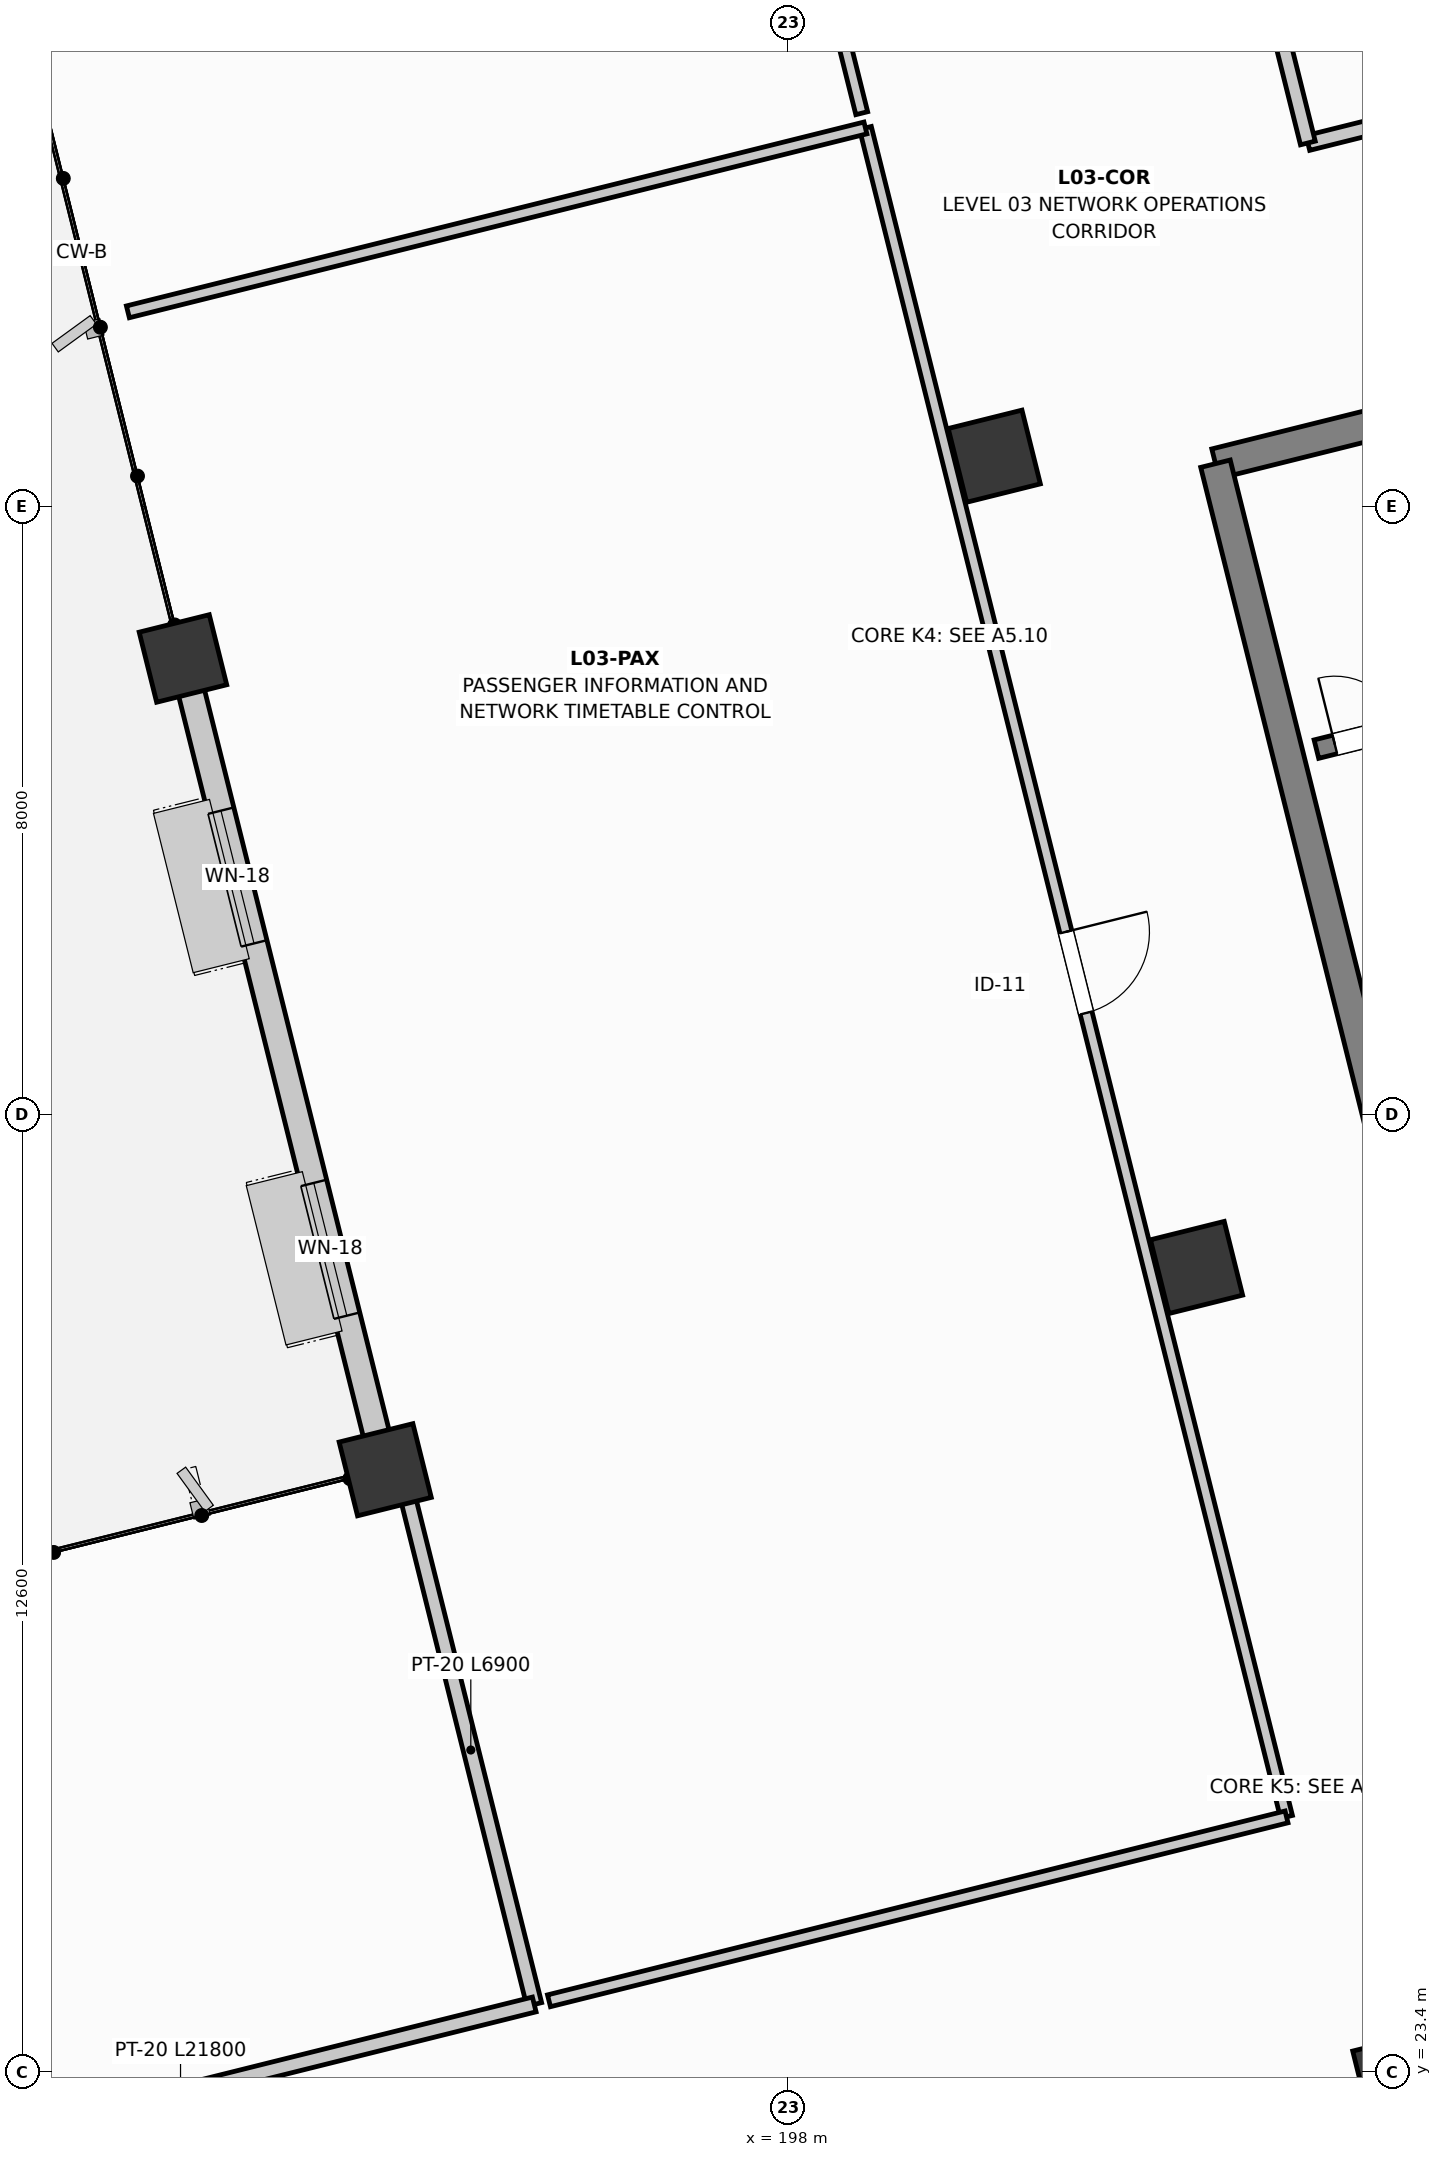
"""IFC4 building model, lengths in metres.
Left out: names, types, materials, properties, quantities, classifications, styles, units other than length and angle.
Written with IfcOpenShell. Run it as: python <this file> out.ifc"""

import sys

from ifc_helpers import new_model, si_unit, direction, frame, frame_2d, origin, origin_2d, place, context, subcontext, project, spatial, rectangle, extrude, element, fill, save


model = new_model("IFC4")
c1 = context("Model", 3, precision=1e-05, world=origin(), true_north=direction((0.0, 1.0)))
c2 = subcontext(c1, "Body", "Model", "MODEL_VIEW")
j1 = project(units=[si_unit("LENGTHUNIT", "METRE"), si_unit("PLANEANGLEUNIT", "RADIAN")], contexts=[c1])
p1 = place(None, origin())
s1 = spatial("IfcSite", under=j1, at=p1, CompositionType="ELEMENT")
p2 = place(p1, origin())
s2 = spatial("IfcBuilding", under=s1, at=p2, CompositionType="ELEMENT")
p3 = place(p2, frame((0.0, 0.0, 16.2)))
s3 = spatial("IfcBuildingStorey", under=s2, at=p3, CompositionType="ELEMENT", Elevation=16.2)
p4 = place(p3, frame((192.697, 31.33, 0.0), z_axis=(0.0, 0.0, 1.0), x_axis=(0.970295726276, 0.2419218956, 0.0)))
e1 = element("IfcColumn", 1, at=p4, inside=s3, PredefinedType="COLUMN", context=c2, shape_type="SweptSolid", body=[
    extrude(rectangle(XDim=1.0, YDim=1.0, at=origin_2d()), origin(), (0.0, 0.0, 1.0), 4.2),
])
p5 = place(p3, frame((190.036, 42.003, 0.0), z_axis=(0.0, 0.0, 1.0), x_axis=(0.970295726276, 0.2419218956, 0.0)))
e2 = element("IfcColumn", 2, at=p5, inside=s3, PredefinedType="COLUMN", context=c2, shape_type="SweptSolid", body=[
    extrude(rectangle(XDim=0.95, YDim=0.95, at=origin_2d()), origin(), (0.0, 0.0, 1.0), 4.2),
])
for number, where, z_axis, x_axis in (
    (3, (206.032, 23.318, 0.0), (0.0, 0.0, 1.0), (0.97, 0.242, 0.0)),
    (4, (203.371, 33.991, 0.0), (0.0, 0.0, 1.0), (0.97, 0.242, 0.0)),
    (5, (200.71, 44.664, 0.0), (0.0, 0.0, 1.0), (0.97, 0.242, 0.0)),
):
    element("IfcColumn", number, at=place(p3, frame(where, z_axis=z_axis, x_axis=x_axis)), inside=s3, PredefinedType="COLUMN", context=c2, shape_type="SweptSolid", body=[
        extrude(rectangle(XDim=1.0, YDim=1.0, at=origin_2d()), origin(), (0.0, 0.0, 1.0), 4.2),
    ])
p6 = place(p3, frame((190.143, 41.576, 0.0), z_axis=(0.0, 0.0, 1.0), x_axis=(0.241927225135, -0.970294397458, 0.0)))
e6 = element("IfcWall", 6, at=p6, inside=s3, PredefinedType="STANDARD", context=c2, shape_type="SweptSolid", body=[
    extrude(rectangle(XDim=10.095, YDim=0.35, at=frame_2d((5.047, 0.0))), origin(), (0.0, 0.0, 1.0), 3.325),
])
p7 = place(p6, frame((1.624, 0.0, 0.85)))
e7 = element("IfcOpeningElement", 7, at=p7, cuts=e6, PredefinedType="OPENING", context=c2, shape_type="SweptSolid", body=[
    extrude(rectangle(XDim=1.8, YDim=1.65, at=frame_2d((0.9, 0.825))), frame((0.0, 0.185, 0.0), z_axis=(0.0, -1.0, 0.0), x_axis=(1.0, 0.0, 0.0)), (0.0, 0.0, 1.0), 0.37),
])
p8 = place(p6, frame((6.671, 0.0, 0.85)))
e8 = element("IfcOpeningElement", 8, at=p8, cuts=e6, PredefinedType="OPENING", context=c2, shape_type="SweptSolid", body=[
    extrude(rectangle(XDim=1.8, YDim=1.65, at=frame_2d((0.9, 0.825))), frame((0.0, 0.185, 0.0), z_axis=(0.0, -1.0, 0.0), x_axis=(1.0, 0.0, 0.0)), (0.0, 0.0, 1.0), 0.37),
])
p9 = place(p3, frame((204.948, 40.81, 0.0), z_axis=(0.0, 0.0, 1.0), x_axis=(0.970297151331, 0.241916179943, 0.0)))
e9 = element("IfcWall", 9, at=p9, inside=s3, PredefinedType="SOLIDWALL", context=c2, shape_type="SweptSolid", body=[
    extrude(rectangle(XDim=9.345, YDim=0.25, at=frame_2d((4.673, 0.0))), origin(), (0.0, 0.0, 1.0), 3.84),
])
p10 = place(p9, frame((0.25, 0.0, 0.0)))
e10 = element("IfcOpeningElement", 10, at=p10, cuts=e9, PredefinedType="OPENING", context=c2, shape_type="SweptSolid", body=[
    extrude(rectangle(XDim=1.8, YDim=2.25, at=frame_2d((0.9, 1.125))), frame((0.0, 0.135, 0.0), z_axis=(0.0, -1.0, 0.0), x_axis=(1.0, 0.0, 0.0)), (0.0, 0.0, 1.0), 0.27),
])
p11 = place(p3, frame((220.309, 48.727, 0.0), z_axis=(0.0, 0.0, 1.0), x_axis=(-0.970296544738, -0.241918612906, 0.0)))
e11 = element("IfcWall", 11, at=p11, inside=s3, PredefinedType="SHEAR", context=c2, shape_type="SweptSolid", body=[
    extrude(rectangle(XDim=17.2, YDim=0.4, at=frame_2d((8.6, 0.0))), origin(), (0.0, 0.0, 1.0), 3.87),
])
p12 = place(p11, frame((5.32, 0.0, 0.0)))
e12 = element("IfcOpeningElement", 12, at=p12, cuts=e11, PredefinedType="OPENING", context=c2, shape_type="SweptSolid", body=[
    extrude(rectangle(XDim=2.0, YDim=2.3, at=frame_2d((1.0, 1.15))), frame((0.0, 0.21, 0.0), z_axis=(0.0, -1.0, 0.0), x_axis=(1.0, 0.0, 0.0)), (0.0, 0.0, 1.0), 0.42),
])
p13 = place(p3, frame((203.62, 44.566, 0.0), z_axis=(0.0, 0.0, 1.0), x_axis=(0.241921199913, -0.97029589973, 0.0)))
e13 = element("IfcWall", 13, at=p13, inside=s3, PredefinedType="SHEAR", context=c2, shape_type="SweptSolid", body=[
    extrude(rectangle(XDim=9.0, YDim=0.4, at=frame_2d((4.5, 0.0))), origin(), (0.0, 0.0, 1.0), 3.87),
])
p14 = place(p3, frame((210.64, 23.849, 0.0), z_axis=(0.0, 0.0, 1.0), x_axis=(-0.970295578967, -0.241922486422, 0.0)))
e14 = element("IfcWall", 14, at=p14, inside=s3, PredefinedType="SHEAR", context=c2, shape_type="SweptSolid", body=[
    extrude(rectangle(XDim=14.2, YDim=0.4, at=frame_2d((7.1, 0.0))), origin(), (0.0, 0.0, 1.0), 3.87),
])
p15 = place(p14, frame((6.1, 0.0, 0.0)))
e15 = element("IfcOpeningElement", 15, at=p15, cuts=e14, PredefinedType="OPENING", context=c2, shape_type="SweptSolid", body=[
    extrude(rectangle(XDim=2.0, YDim=2.3, at=frame_2d((1.0, 1.15))), frame((0.0, 0.21, 0.0), z_axis=(0.0, -1.0, 0.0), x_axis=(1.0, 0.0, 0.0)), (0.0, 0.0, 1.0), 0.42),
])
p16 = place(p3, frame((192.988, 30.99, 0.0), z_axis=(0.0, 0.0, 1.0), x_axis=(0.241928584312, -0.970294058568, 0.0)))
e16 = element("IfcWall", 16, at=p16, inside=s3, PredefinedType="PARTITIONING", context=c2, shape_type="SweptSolid", body=[
    extrude(rectangle(XDim=6.9, YDim=0.2, at=frame_2d((3.45, 0.0))), origin(), (0.0, 0.0, 1.0), 2.785),
])
p17 = place(p3, frame((194.658, 24.295, 0.0), z_axis=(0.0, 0.0, 1.0), x_axis=(-0.970295840199, -0.241921438678, 0.0)))
e17 = element("IfcWall", 17, at=p17, inside=s3, PredefinedType="PARTITIONING", context=c2, shape_type="SweptSolid", body=[
    extrude(rectangle(XDim=21.8, YDim=0.2, at=frame_2d((10.9, 0.0))), origin(), (0.0, 0.0, 1.0), 2.635),
])
p18 = place(p17, frame((10.0, 0.0, 0.0)))
e18 = element("IfcOpeningElement", 18, at=p18, cuts=e17, PredefinedType="OPENING", context=c2, shape_type="SweptSolid", body=[
    extrude(rectangle(XDim=1.8, YDim=2.25, at=frame_2d((0.9, 1.125))), frame((0.0, 0.11, 0.0), z_axis=(0.0, -1.0, 0.0), x_axis=(1.0, 0.0, 0.0)), (0.0, 0.0, 1.0), 0.22),
])
p19 = place(p3, frame((199.015, 48.983, 0.0), z_axis=(0.0, 0.0, 1.0), x_axis=(0.241922165924, -0.970295658877, 0.0)))
e19 = element("IfcWall", 19, at=p19, inside=s3, PredefinedType="PARTITIONING", context=c2, shape_type="SweptSolid", body=[
    extrude(rectangle(XDim=22.9, YDim=0.16, at=frame_2d((11.45, 0.0))), origin(), (0.0, 0.0, 1.0), 2.585),
])
p20 = place(p19, frame((10.9, 0.0, 0.0)))
e20 = element("IfcOpeningElement", 20, at=p20, cuts=e19, PredefinedType="OPENING", context=c2, shape_type="SweptSolid", body=[
    extrude(rectangle(XDim=1.1, YDim=2.2, at=frame_2d((0.55, 1.1))), frame((0.0, 0.09, 0.0), z_axis=(0.0, -1.0, 0.0), x_axis=(1.0, 0.0, 0.0)), (0.0, 0.0, 1.0), 0.18),
])
p21 = place(p3, frame((204.555, 26.763, 0.0), z_axis=(0.0, 0.0, 1.0), x_axis=(-0.970294073996, -0.241928522438, 0.0)))
e21 = element("IfcWall", 21, at=p21, inside=s3, PredefinedType="PARTITIONING", context=c2, shape_type="SweptSolid", body=[
    extrude(rectangle(XDim=10.0, YDim=0.16, at=frame_2d((5.0, 0.0))), origin(), (0.0, 0.0, 1.0), 3.475),
])
p22 = place(p3, frame((189.312, 46.563, 0.0), z_axis=(0.0, 0.0, 1.0), x_axis=(0.970296421359, 0.241919107756, 0.0)))
e22 = element("IfcWall", 22, at=p22, inside=s3, PredefinedType="PARTITIONING", context=c2, shape_type="SweptSolid", body=[
    extrude(rectangle(XDim=10.0, YDim=0.16, at=frame_2d((5.0, 0.0))), origin(), (0.0, 0.0, 1.0), 2.715),
])
p23 = place(p3, frame((192.289, 75.957, 0.0), z_axis=(0.0, 0.0, 1.0), x_axis=(0.241923472165, -0.970295333193, 0.0)))
e23 = element("IfcWall", 23, at=p23, inside=s3, PredefinedType="PARTITIONING", context=c2, shape_type="SweptSolid", body=[
    extrude(rectangle(XDim=27.6, YDim=0.16, at=frame_2d((13.8, 0.0))), origin(), (0.0, 0.0, 1.0), 2.665),
])
p24 = place(p23, frame((13.25, 0.0, 0.0)))
e24 = element("IfcOpeningElement", 24, at=p24, cuts=e23, PredefinedType="OPENING", context=c2, shape_type="SweptSolid", body=[
    extrude(rectangle(XDim=1.1, YDim=2.2, at=frame_2d((0.55, 1.1))), frame((0.0, 0.09, 0.0), z_axis=(0.0, -1.0, 0.0), x_axis=(1.0, 0.0, 0.0)), (0.0, 0.0, 1.0), 0.18),
])
p25 = place(p3, frame((220.748, 52.752, 0.0), z_axis=(0.0, 0.0, 1.0), x_axis=(-0.970296178232, -0.241920082897, 0.0)))
e25 = element("IfcWall", 25, at=p25, inside=s3, PredefinedType="PARTITIONING", context=c2, shape_type="SweptSolid", body=[
    extrude(rectangle(XDim=16.4, YDim=0.2, at=frame_2d((8.2, 0.0))), origin(), (0.0, 0.0, 1.0), 2.785),
])
p26 = place(p25, frame((7.65, 0.0, 0.0)))
e26 = element("IfcOpeningElement", 26, at=p26, cuts=e25, PredefinedType="OPENING", context=c2, shape_type="SweptSolid", body=[
    extrude(rectangle(XDim=1.1, YDim=2.2, at=frame_2d((0.55, 1.1))), frame((0.0, 0.11, 0.0), z_axis=(0.0, -1.0, 0.0), x_axis=(1.0, 0.0, 0.0)), (0.0, 0.0, 1.0), 0.22),
])
p27 = place(p3, frame((204.835, 48.785, 0.0), z_axis=(0.0, 0.0, 1.0), x_axis=(-0.241921368909, 0.970295857595, 0.0)))
e27 = element("IfcWall", 27, at=p27, inside=s3, PredefinedType="PARTITIONING", context=c2, shape_type="SweptSolid", body=[
    extrude(rectangle(XDim=15.4, YDim=0.2, at=frame_2d((7.7, 0.0))), origin(), (0.0, 0.0, 1.0), 3.195),
])
p28 = place(p7, origin())
e28 = element("IfcWindow", 28, at=p28, inside=s3, PartitioningType="SINGLE_PANEL", PredefinedType="WINDOW", context=c2, shape_type="SweptSolid", body=[
    extrude(rectangle(XDim=1.8, YDim=1.65, at=frame_2d((0.9, 0.825))), frame((0.0, 0.03, 0.0), z_axis=(0.0, -1.0, 0.0), x_axis=(1.0, 0.0, 0.0)), (0.0, 0.0, 1.0), 0.06),
])
fill(e7, e28)
p29 = place(p8, origin())
e29 = element("IfcWindow", 29, at=p29, inside=s3, PartitioningType="SINGLE_PANEL", PredefinedType="WINDOW", context=c2, shape_type="SweptSolid", body=[
    extrude(rectangle(XDim=1.8, YDim=1.65, at=frame_2d((0.9, 0.825))), frame((0.0, 0.03, 0.0), z_axis=(0.0, -1.0, 0.0), x_axis=(1.0, 0.0, 0.0)), (0.0, 0.0, 1.0), 0.06),
])
fill(e8, e29)
p30 = place(p10, origin())
e30 = element("IfcDoor", 30, at=p30, inside=s3, OperationType="DOUBLE_DOOR_SINGLE_SWING", PredefinedType="DOOR", context=c2, shape_type="SweptSolid", body=[
    extrude(rectangle(XDim=1.8, YDim=2.25, at=frame_2d((0.9, 1.125))), frame((0.0, 0.025, 0.0), z_axis=(0.0, -1.0, 0.0), x_axis=(1.0, 0.0, 0.0)), (0.0, 0.0, 1.0), 0.05),
])
fill(e10, e30)
p31 = place(p20, origin())
e31 = element("IfcDoor", 31, at=p31, inside=s3, OperationType="SINGLE_SWING_LEFT", PredefinedType="DOOR", context=c2, shape_type="SweptSolid", body=[
    extrude(rectangle(XDim=1.1, YDim=2.2, at=frame_2d((0.55, 1.1))), frame((0.0, 0.025, 0.0), z_axis=(0.0, -1.0, 0.0), x_axis=(1.0, 0.0, 0.0)), (0.0, 0.0, 1.0), 0.05),
])
fill(e20, e31)
save(model, sys.argv[1])
